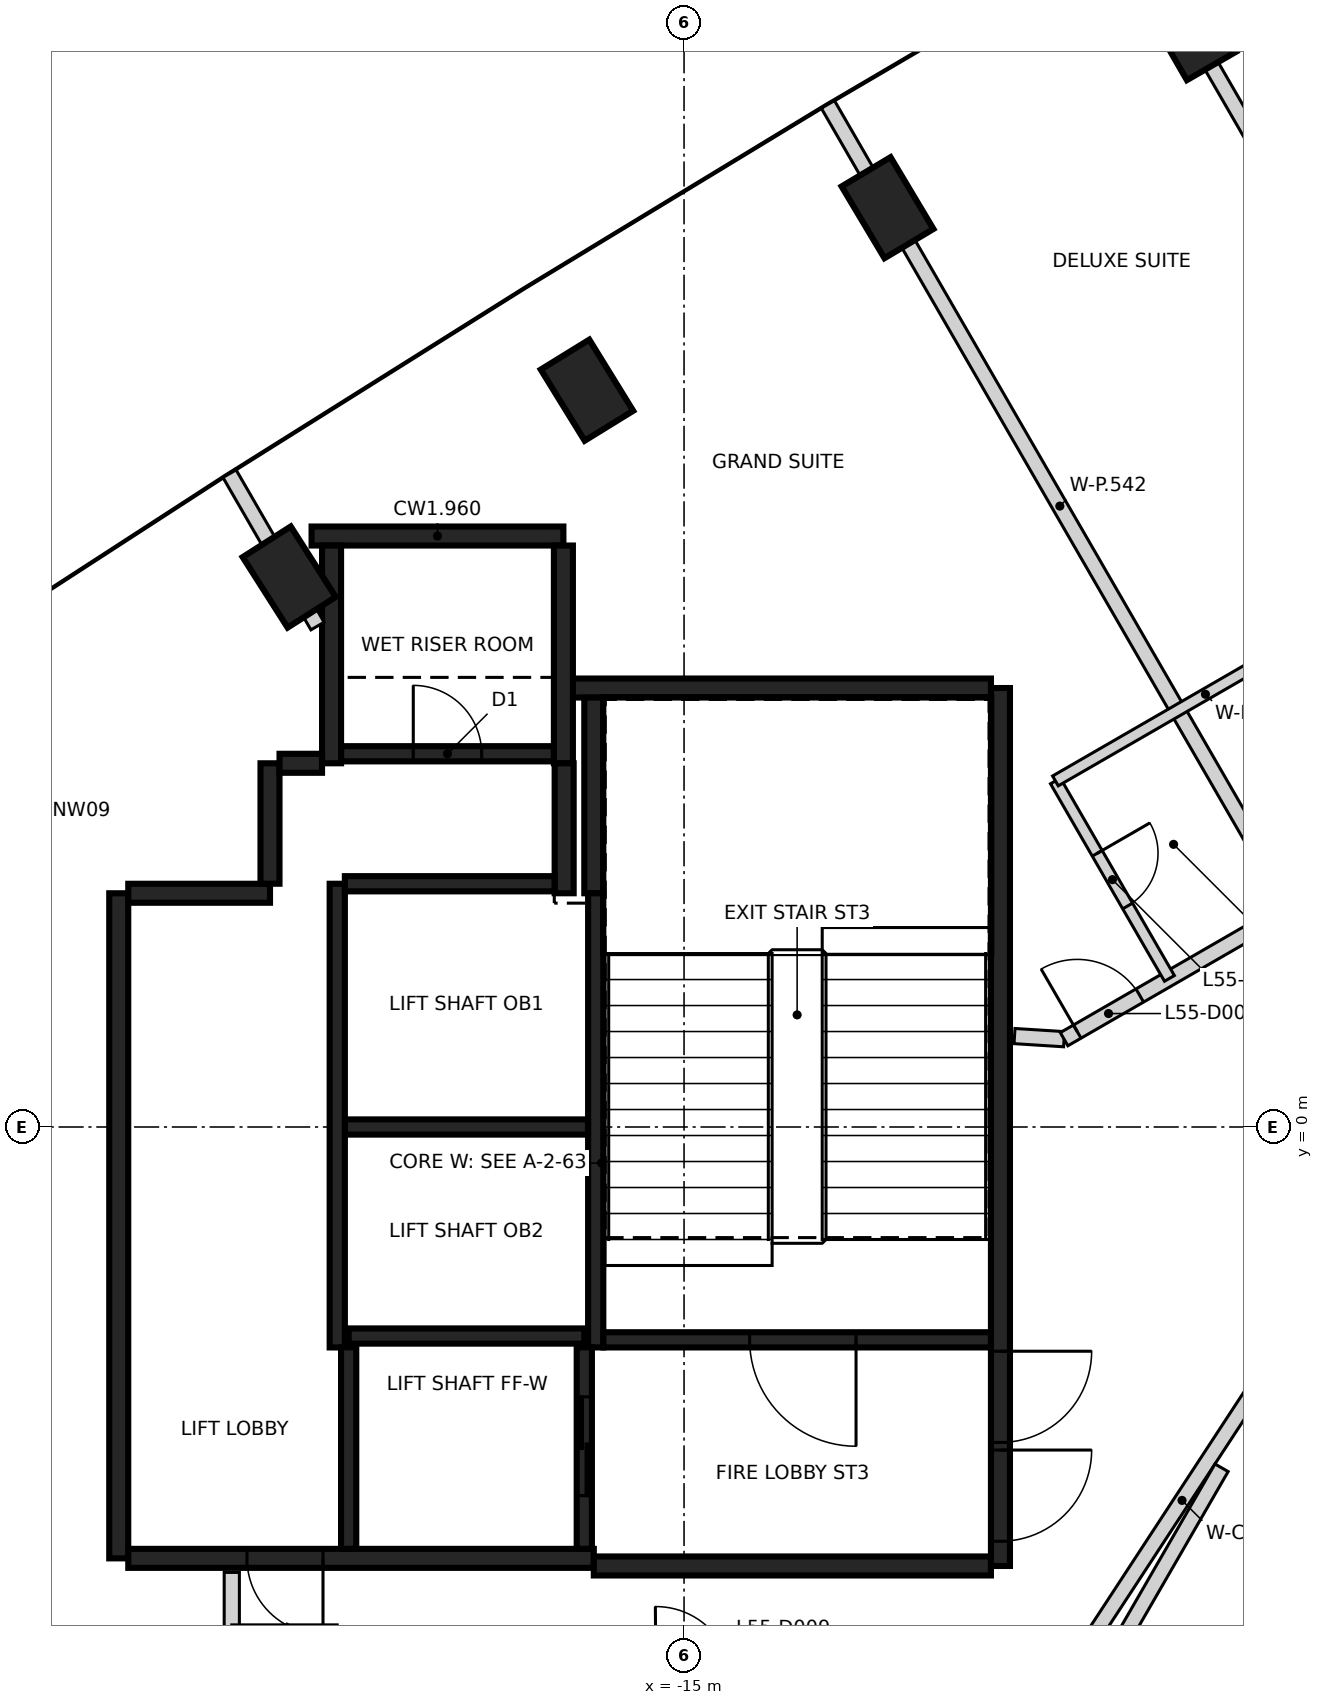
"""IFC4 building model, lengths in metres.
Left out: names, types, materials, properties, quantities, classifications, styles, units other than length and angle.
Written with IfcOpenShell. Run it as: python <this file> out.ifc"""

import sys

from ifc_helpers import new_model, si_unit, direction, frame, frame_2d, origin, origin_2d, place, context, subcontext, project, spatial, rectangle, extrude, element, fill, save


model = new_model("IFC4")
c1 = context("Model", 3, precision=1e-05, world=origin(), true_north=direction((0.0, 1.0)))
c2 = subcontext(c1, "Body", "Model", "MODEL_VIEW")
j1 = project(units=[si_unit("LENGTHUNIT", "METRE"), si_unit("PLANEANGLEUNIT", "RADIAN")], contexts=[c1])
p1 = place(None, origin())
s1 = spatial("IfcSite", under=j1, at=p1, CompositionType="ELEMENT")
p2 = place(p1, origin())
s2 = spatial("IfcBuilding", under=s1, at=p2, CompositionType="ELEMENT")
p3 = place(p2, frame((0.0, 0.0, 221.4)))
s3 = spatial("IfcBuildingStorey", under=s2, at=p3, CompositionType="ELEMENT", Elevation=221.4)
for number, where, z_axis, x_axis in (
    (1, (-8.335, 14.436, -0.35), (0.0, 0.0, 1.0), (-0.5, 0.866, 0.0)),
    (2, (-12.323, 12.094, -0.35), (0.0, 0.0, 1.0), (-0.513, 0.858, 0.0)),
    (3, (-16.277, 9.693, -0.35), (0.0, 0.0, 1.0), (-0.525, 0.851, 0.0)),
    (4, (-20.195, 7.235, -0.35), (0.0, 0.0, 1.0), (-0.538, 0.843, 0.0)),
):
    element("IfcColumn", number, at=place(p3, frame(where, z_axis=z_axis, x_axis=x_axis)), inside=s3, PredefinedType="COLUMN", context=c2, shape_type="SweptSolid", body=[
        extrude(rectangle(XDim=1.1, YDim=0.75, at=origin_2d()), origin(), (0.0, 0.0, 1.0), 3.6),
    ])
p4 = place(p3, frame((-10.837, 5.775, 0.0), z_axis=(0.0, 0.0, 1.0), x_axis=(0.0, -1.0, 0.0)))
e5 = element("IfcWall", 5, at=p4, inside=s3, PredefinedType="SHEAR", context=c2, shape_type="SweptSolid", body=[
    extrude(rectangle(XDim=11.55, YDim=0.25, at=frame_2d((5.775, 0.0))), origin(), (0.0, 0.0, 1.0), 3.25),
])
p5 = place(p4, frame((10.025, 0.0, 0.0)))
e6 = element("IfcOpeningElement", 6, at=p5, cuts=e5, PredefinedType="OPENING", context=c2, shape_type="SweptSolid", body=[
    extrude(rectangle(XDim=1.2, YDim=2.1, at=frame_2d((0.6, 1.05))), frame((0.0, 0.135, 0.0), z_axis=(0.0, -1.0, 0.0), x_axis=(1.0, 0.0, 0.0)), (0.0, 0.0, 1.0), 0.27),
])
p6 = place(p4, frame((8.725, 0.0, 0.0)))
e7 = element("IfcOpeningElement", 7, at=p6, cuts=e5, PredefinedType="OPENING", context=c2, shape_type="SweptSolid", body=[
    extrude(rectangle(XDim=1.2, YDim=2.1, at=frame_2d((0.6, 1.05))), frame((0.0, 0.135, 0.0), z_axis=(0.0, -1.0, 0.0), x_axis=(1.0, 0.0, 0.0)), (0.0, 0.0, 1.0), 0.27),
])
p7 = place(p3, frame((-22.437, -5.675, 0.0), z_axis=(0.0, 0.0, 1.0), x_axis=(0.0, 1.0, 0.0)))
e8 = element("IfcWall", 8, at=p7, inside=s3, PredefinedType="SHEAR", context=c2, shape_type="SweptSolid", body=[
    extrude(rectangle(XDim=8.75, YDim=0.25, at=frame_2d((4.375, 0.0))), origin(), (0.0, 0.0, 1.0), 3.25),
])
p8 = place(p3, frame((-16.187, -5.675, 0.0), z_axis=(0.0, 0.0, 1.0), x_axis=(-1.0, 0.0, 0.0)))
e9 = element("IfcWall", 9, at=p8, inside=s3, PredefinedType="SHEAR", context=c2, shape_type="SweptSolid", body=[
    extrude(rectangle(XDim=6.125, YDim=0.25, at=frame_2d((3.062, 0.0))), origin(), (0.0, 0.0, 1.0), 3.25),
])
p9 = place(p8, frame((3.563, 0.0, 0.0)))
e10 = element("IfcOpeningElement", 10, at=p9, cuts=e9, PredefinedType="OPENING", context=c2, shape_type="SweptSolid", body=[
    extrude(rectangle(XDim=1.0, YDim=2.1, at=frame_2d((0.5, 1.05))), frame((0.0, 0.135, 0.0), z_axis=(0.0, -1.0, 0.0), x_axis=(1.0, 0.0, 0.0)), (0.0, 0.0, 1.0), 0.27),
])
p10 = place(p3, frame((-10.963, -5.775, 0.0), z_axis=(0.0, 0.0, 1.0), x_axis=(-1.0, 0.0, 0.0)))
e11 = element("IfcWall", 11, at=p10, inside=s3, PredefinedType="SHEAR", context=c2, shape_type="SweptSolid", body=[
    extrude(rectangle(XDim=5.225, YDim=0.25, at=frame_2d((2.612, 0.0))), origin(), (0.0, 0.0, 1.0), 3.25),
])
p11 = place(p3, frame((-16.472, 5.775, 0.0), z_axis=(0.0, 0.0, 1.0), x_axis=(1.0, 0.0, 0.0)))
e12 = element("IfcWall", 12, at=p11, inside=s3, PredefinedType="SHEAR", context=c2, shape_type="SweptSolid", body=[
    extrude(rectangle(XDim=5.51, YDim=0.25, at=frame_2d((2.755, 0.0))), origin(), (0.0, 0.0, 1.0), 3.25),
])
p12 = place(p3, frame((-19.9, 7.775, 0.0), z_axis=(0.0, 0.0, 1.0), x_axis=(1.0, 0.0, 0.0)))
e13 = element("IfcWall", 13, at=p12, inside=s3, PredefinedType="SHEAR", context=c2, shape_type="SweptSolid", body=[
    extrude(rectangle(XDim=3.313, YDim=0.25, at=frame_2d((1.656, 0.0))), origin(), (0.0, 0.0, 1.0), 3.25),
])
for number, where, z_axis, x_axis in (
    (14, (-16.587, 7.65, 0.0), (0.0, 0.0, 1.0), (0.0, -1.0, 0.0)),
    (15, (-19.637, 4.785, 0.0), (0.0, 0.0, 1.0), (0.0, 1.0, 0.0)),
):
    element("IfcWall", number, at=place(p3, frame(where, z_axis=z_axis, x_axis=x_axis)), inside=s3, PredefinedType="SHEAR", context=c2, shape_type="SweptSolid", body=[
        extrude(rectangle(XDim=2.865, YDim=0.25, at=frame_2d((1.432, 0.0))), origin(), (0.0, 0.0, 1.0), 3.25),
    ])
p13 = place(p3, frame((-16.187, 3.075, 0.0), z_axis=(0.0, 0.0, 1.0), x_axis=(0.0, 1.0, 0.0)))
e16 = element("IfcWall", 16, at=p13, inside=s3, PredefinedType="SHEAR", context=c2, shape_type="SweptSolid", body=[
    extrude(rectangle(XDim=2.575, YDim=0.25, at=frame_2d((1.287, 0.0))), origin(), (0.0, 0.0, 1.0), 3.25),
])
p14 = place(p3, frame((-22.312, 3.075, 0.0), z_axis=(0.0, 0.0, 1.0), x_axis=(1.0, 0.0, 0.0)))
e17 = element("IfcWall", 17, at=p14, inside=s3, PredefinedType="SHEAR", context=c2, shape_type="SweptSolid", body=[
    extrude(rectangle(XDim=1.865, YDim=0.25, at=frame_2d((0.932, 0.0))), origin(), (0.0, 0.0, 1.0), 3.25),
])
p15 = place(p3, frame((-16.577, 4.785, 0.0), z_axis=(0.0, 0.0, 1.0), x_axis=(0.0, -1.0, 0.0)))
e18 = element("IfcWall", 18, at=p15, inside=s3, PredefinedType="SHEAR", context=c2, shape_type="SweptSolid", body=[
    extrude(rectangle(XDim=1.71, YDim=0.25, at=frame_2d((0.855, 0.0))), origin(), (0.0, 0.0, 1.0), 3.25),
])
p16 = place(p3, frame((-20.447, 3.2, 0.0), z_axis=(0.0, 0.0, 1.0), x_axis=(0.0, 1.0, 0.0)))
e19 = element("IfcWall", 19, at=p16, inside=s3, PredefinedType="SHEAR", context=c2, shape_type="SweptSolid", body=[
    extrude(rectangle(XDim=1.584, YDim=0.25, at=frame_2d((0.792, 0.0))), origin(), (0.0, 0.0, 1.0), 3.25),
])
p17 = place(p3, frame((-20.322, 4.785, 0.0), z_axis=(0.0, 0.0, 1.0), x_axis=(1.0, 0.0, 0.0)))
e20 = element("IfcWall", 20, at=p17, inside=s3, PredefinedType="SHEAR", context=c2, shape_type="SweptSolid", body=[
    extrude(rectangle(XDim=0.559, YDim=0.25, at=frame_2d((0.28, 0.0))), origin(), (0.0, 0.0, 1.0), 3.25),
])
p18 = place(p3, frame((-16.162, 3.074, 0.0), z_axis=(0.0, 0.0, 1.0), x_axis=(0.0, -1.0, 0.0)))
e21 = element("IfcWall", 21, at=p18, inside=s3, PredefinedType="SHEAR", context=c2, shape_type="SweptSolid", body=[
    extrude(rectangle(XDim=5.974, YDim=0.2, at=frame_2d((2.987, 0.0))), origin(), (0.0, 0.0, 1.0), 3.25),
])
p19 = place(p3, frame((-19.562, -2.9, 0.0), z_axis=(0.0, 0.0, 1.0), x_axis=(0.0, 1.0, 0.0)))
e22 = element("IfcWall", 22, at=p19, inside=s3, PredefinedType="SHEAR", context=c2, shape_type="SweptSolid", body=[
    extrude(rectangle(XDim=6.1, YDim=0.2, at=frame_2d((3.05, 0.0))), origin(), (0.0, 0.0, 1.0), 3.25),
])
p20 = place(p3, frame((-10.963, -2.8, 0.0), z_axis=(0.0, 0.0, 1.0), x_axis=(-1.0, 0.0, 0.0)))
e23 = element("IfcWall", 23, at=p20, inside=s3, PredefinedType="SHEAR", context=c2, shape_type="SweptSolid", body=[
    extrude(rectangle(XDim=5.098, YDim=0.2, at=frame_2d((2.549, 0.0))), origin(), (0.0, 0.0, 1.0), 3.25),
])
p21 = place(p20, frame((1.774, 0.0, 0.0)))
e24 = element("IfcOpeningElement", 24, at=p21, cuts=e23, PredefinedType="OPENING", context=c2, shape_type="SweptSolid", body=[
    extrude(rectangle(XDim=1.4, YDim=2.1, at=frame_2d((0.7, 1.05))), frame((0.0, 0.11, 0.0), z_axis=(0.0, -1.0, 0.0), x_axis=(1.0, 0.0, 0.0)), (0.0, 0.0, 1.0), 0.22),
])
p22 = place(p3, frame((-16.263, 0.0, 0.0), z_axis=(0.0, 0.0, 1.0), x_axis=(-1.0, 0.0, 0.0)))
e25 = element("IfcWall", 25, at=p22, inside=s3, PredefinedType="SHEAR", context=c2, shape_type="SweptSolid", body=[
    extrude(rectangle(XDim=3.198, YDim=0.2, at=frame_2d((1.599, 0.0))), origin(), (0.0, 0.0, 1.0), 3.25),
])
p23 = place(p3, frame((-19.511, 4.91, 0.0), z_axis=(0.0, 0.0, 1.0), x_axis=(1.0, 0.0, 0.0)))
e26 = element("IfcWall", 26, at=p23, inside=s3, PredefinedType="SHEAR", context=c2, shape_type="SweptSolid", body=[
    extrude(rectangle(XDim=2.798, YDim=0.2, at=frame_2d((1.399, 0.0))), origin(), (0.0, 0.0, 1.0), 3.25),
])
p24 = place(p23, frame((0.949, 0.0, 0.0)))
e27 = element("IfcOpeningElement", 27, at=p24, cuts=e26, PredefinedType="OPENING", context=c2, shape_type="SweptSolid", body=[
    extrude(rectangle(XDim=0.9, YDim=2.1, at=frame_2d((0.45, 1.05))), frame((0.0, 0.11, 0.0), z_axis=(0.0, -1.0, 0.0), x_axis=(1.0, 0.0, 0.0)), (0.0, 0.0, 1.0), 0.22),
])
p25 = place(p3, frame((-19.462, 3.2, 0.0), z_axis=(0.0, 0.0, 1.0), x_axis=(1.0, 0.0, 0.0)))
e28 = element("IfcWall", 28, at=p25, inside=s3, PredefinedType="SHEAR", context=c2, shape_type="SweptSolid", body=[
    extrude(rectangle(XDim=2.759, YDim=0.2, at=frame_2d((1.379, 0.0))), origin(), (0.0, 0.0, 1.0), 3.25),
])
p26 = place(p3, frame((-19.412, -2.75, 0.0), z_axis=(0.0, 0.0, 1.0), x_axis=(1.0, 0.0, 0.0)))
e29 = element("IfcWall", 29, at=p26, inside=s3, PredefinedType="SHEAR", context=c2, shape_type="SweptSolid", body=[
    extrude(rectangle(XDim=3.1, YDim=0.2, at=frame_2d((1.55, 0.0))), origin(), (0.0, 0.0, 1.0), 3.25),
])
p27 = place(p3, frame((-16.312, -2.898, 0.0), z_axis=(0.0, 0.0, 1.0), x_axis=(0.0, -1.0, 0.0)))
e30 = element("IfcWall", 30, at=p27, inside=s3, PredefinedType="SHEAR", context=c2, shape_type="SweptSolid", body=[
    extrude(rectangle(XDim=2.651, YDim=0.2, at=frame_2d((1.325, 0.0))), origin(), (0.0, 0.0, 1.0), 3.25),
])
p28 = place(p27, frame((0.652, 0.0, 0.0)))
e31 = element("IfcOpeningElement", 31, at=p28, cuts=e30, PredefinedType="OPENING", context=c2, shape_type="SweptSolid", body=[
    extrude(rectangle(XDim=1.3, YDim=2.1, at=frame_2d((0.65, 1.05))), frame((0.0, 0.11, 0.0), z_axis=(0.0, -1.0, 0.0), x_axis=(1.0, 0.0, 0.0)), (0.0, 0.0, 1.0), 0.22),
])
p29 = place(p3, frame((-19.412, -5.549, 0.0), z_axis=(0.0, 0.0, 1.0), x_axis=(0.0, 1.0, 0.0)))
e32 = element("IfcWall", 32, at=p29, inside=s3, PredefinedType="SHEAR", context=c2, shape_type="SweptSolid", body=[
    extrude(rectangle(XDim=2.651, YDim=0.2, at=frame_2d((1.325, 0.0))), origin(), (0.0, 0.0, 1.0), 3.25),
])
p30 = place(p3, frame((-20.95, -6.65, 0.0), z_axis=(0.0, 0.0, 1.0), x_axis=(0.0, 1.0, 0.0)))
e33 = element("IfcWall", 33, at=p30, inside=s3, PredefinedType="PARTITIONING", context=c2, shape_type="SweptSolid", body=[
    extrude(rectangle(XDim=0.79, YDim=0.2, at=frame_2d((0.395, 0.0))), origin(), (0.0, 0.0, 1.0), 2.35),
])
p31 = place(p3, frame((-20.95, -6.65, 0.0), z_axis=(0.0, 0.0, 1.0), x_axis=(1.0, 0.0, 0.0)))
e34 = element("IfcWall", 34, at=p31, inside=s3, PredefinedType="PARTITIONING", context=c2, shape_type="SweptSolid", body=[
    extrude(rectangle(XDim=1.387, YDim=0.2, at=frame_2d((0.693, 0.0))), origin(), (0.0, 0.0, 1.0), 2.35),
])
p32 = place(p3, frame((-10.652, 1.196, 0.0), z_axis=(0.0, 0.0, 1.0), x_axis=(0.998005794618, -0.063122372489, 0.0)))
e35 = element("IfcWall", 35, at=p32, inside=s3, PredefinedType="PARTITIONING", context=c2, shape_type="SweptSolid", body=[
    extrude(rectangle(XDim=0.654, YDim=0.2, at=frame_2d((0.327, 0.0))), origin(), (0.0, 0.0, 1.0), 3.25),
])
p33 = place(p3, frame((-10.0, 1.155, 0.0), z_axis=(0.0, 0.0, 1.0), x_axis=(0.866014095592, 0.500019585852, 0.0)))
e36 = element("IfcWall", 36, at=p33, inside=s3, PredefinedType="PARTITIONING", context=c2, shape_type="SweptSolid", body=[
    extrude(rectangle(XDim=12.708, YDim=0.2, at=frame_2d((6.354, 0.0))), origin(), (0.0, 0.0, 1.0), 3.25),
])
p34 = place(p33, frame((6.944, 0.0, 0.0)))
e37 = element("IfcOpeningElement", 37, at=p34, cuts=e36, PredefinedType="OPENING", context=c2, shape_type="SweptSolid", body=[
    extrude(rectangle(XDim=0.95, YDim=2.1, at=frame_2d((0.475, 1.05))), frame((0.0, 0.11, 0.0), z_axis=(0.0, -1.0, 0.0), x_axis=(1.0, 0.0, 0.0)), (0.0, 0.0, 1.0), 0.22),
])
p35 = place(p33, frame((0.2, 0.0, 0.0)))
e38 = element("IfcOpeningElement", 38, at=p35, cuts=e36, PredefinedType="OPENING", context=c2, shape_type="SweptSolid", body=[
    extrude(rectangle(XDim=0.95, YDim=2.1, at=frame_2d((0.475, 1.05))), frame((0.0, 0.11, 0.0), z_axis=(0.0, -1.0, 0.0), x_axis=(1.0, 0.0, 0.0)), (0.0, 0.0, 1.0), 0.22),
])
p36 = place(p3, frame((-9.808, -6.989, 0.0), z_axis=(0.0, 0.0, 1.0), x_axis=(0.547746188785, 0.836644555753, 0.0)))
e39 = element("IfcWall", 39, at=p36, inside=s3, PredefinedType="PARTITIONING", context=c2, shape_type="SweptSolid", body=[
    extrude(rectangle(XDim=4.964, YDim=0.2, at=frame_2d((2.482, 0.0))), origin(), (0.0, 0.0, 1.0), 3.25),
])
p37 = place(p3, frame((-20.979, 8.595, 0.0), z_axis=(0.0, 0.0, 1.0), x_axis=(0.499950711303, -0.866053858757, 0.0)))
e40 = element("IfcWall", 40, at=p37, inside=s3, PredefinedType="PARTITIONING", context=c2, shape_type="SweptSolid", body=[
    extrude(rectangle(XDim=2.315, YDim=0.2, at=frame_2d((1.157, 0.0))), origin(), (0.0, 0.0, 1.0), 3.25),
])
p38 = place(p3, frame((-13.107, 13.453, 0.0), z_axis=(0.0, 0.0, 1.0), x_axis=(0.500037611077, -0.86600368793, 0.0)))
e41 = element("IfcWall", 41, at=p38, inside=s3, PredefinedType="PARTITIONING", context=c2, shape_type="SweptSolid", body=[
    extrude(rectangle(XDim=12.204, YDim=0.2, at=frame_2d((6.102, 0.0))), origin(), (0.0, 0.0, 1.0), 3.25),
])
p39 = place(p3, frame((-13.107, -13.453, 0.0), z_axis=(0.0, 0.0, 1.0), x_axis=(0.500020349827, 0.866013654488, 0.0)))
e42 = element("IfcWall", 42, at=p39, inside=s3, PredefinedType="PARTITIONING", context=c2, shape_type="SweptSolid", body=[
    extrude(rectangle(XDim=10.357, YDim=0.2, at=frame_2d((5.179, 0.0))), origin(), (0.0, 0.0, 1.0), 3.25),
])
for number, where, z_axis, x_axis in (
    (43, (-9.119, 15.795, 0.0), (0.0, 0.0, 1.0), (0.5, -0.866, 0.0)),
    (44, (-9.119, -15.795, 0.0), (0.0, 0.0, 1.0), (0.5, 0.866, 0.0)),
):
    element("IfcWall", number, at=place(p3, frame(where, z_axis=z_axis, x_axis=x_axis)), inside=s3, PredefinedType="PARTITIONING", context=c2, shape_type="SweptSolid", body=[
        extrude(rectangle(XDim=12.238, YDim=0.2, at=frame_2d((6.119, 0.0))), origin(), (0.0, 0.0, 1.0), 3.25),
    ])
p40 = place(p3, frame((-10.114, 4.553, 0.0), z_axis=(0.0, 0.0, 1.0), x_axis=(0.50002537861, -0.866010750942, 0.0)))
e45 = element("IfcWall", 45, at=p40, inside=s3, PredefinedType="PARTITIONING", context=c2, shape_type="SweptSolid", body=[
    extrude(rectangle(XDim=3.0, YDim=0.15, at=frame_2d((1.5, 0.0))), origin(), (0.0, 0.0, 1.0), 3.25),
])
p41 = place(p40, frame((1.1, 0.0, 0.0)))
e46 = element("IfcOpeningElement", 46, at=p41, cuts=e45, PredefinedType="OPENING", context=c2, shape_type="SweptSolid", body=[
    extrude(rectangle(XDim=0.8, YDim=2.1, at=frame_2d((0.4, 1.05))), frame((0.0, 0.085, 0.0), z_axis=(0.0, -1.0, 0.0), x_axis=(1.0, 0.0, 0.0)), (0.0, 0.0, 1.0), 0.17),
])
p42 = place(p3, frame((-10.114, 4.553, 0.0), z_axis=(0.0, 0.0, 1.0), x_axis=(0.866002713795, 0.500039298155, 0.0)))
e47 = element("IfcWall", 47, at=p42, inside=s3, PredefinedType="PARTITIONING", context=c2, shape_type="SweptSolid", body=[
    extrude(rectangle(XDim=4.558, YDim=0.15, at=frame_2d((2.279, 0.0))), origin(), (0.0, 0.0, 1.0), 3.25),
])
p43 = place(p28, origin())
e48 = element("IfcDoor", 48, at=p43, inside=s3, OperationType="SLIDING_TO_LEFT", PredefinedType="DOOR", context=c2, shape_type="SweptSolid", body=[
    extrude(rectangle(XDim=1.3, YDim=2.1, at=frame_2d((0.65, 1.05))), frame((0.0, 0.025, 0.0), z_axis=(0.0, -1.0, 0.0), x_axis=(1.0, 0.0, 0.0)), (0.0, 0.0, 1.0), 0.05),
])
fill(e31, e48)
p44 = place(p9, origin())
e49 = element("IfcDoor", 49, at=p44, inside=s3, OperationType="SINGLE_SWING_LEFT", PredefinedType="DOOR", context=c2, shape_type="SweptSolid", body=[
    extrude(rectangle(XDim=1.0, YDim=2.1, at=frame_2d((0.5, 1.05))), frame((0.0, 0.025, 0.0), z_axis=(0.0, -1.0, 0.0), x_axis=(1.0, 0.0, 0.0)), (0.0, 0.0, 1.0), 0.05),
])
fill(e10, e49)
p45 = place(p5, origin())
e50 = element("IfcDoor", 50, at=p45, inside=s3, OperationType="SINGLE_SWING_LEFT", PredefinedType="DOOR", context=c2, shape_type="SweptSolid", body=[
    extrude(rectangle(XDim=1.2, YDim=2.1, at=frame_2d((0.6, 1.05))), frame((0.0, 0.025, 0.0), z_axis=(0.0, -1.0, 0.0), x_axis=(1.0, 0.0, 0.0)), (0.0, 0.0, 1.0), 0.05),
])
fill(e6, e50)
p46 = place(p6, origin())
e51 = element("IfcDoor", 51, at=p46, inside=s3, OperationType="SINGLE_SWING_RIGHT", PredefinedType="DOOR", context=c2, shape_type="SweptSolid", body=[
    extrude(rectangle(XDim=1.2, YDim=2.1, at=frame_2d((0.6, 1.05))), frame((0.0, 0.025, 0.0), z_axis=(0.0, -1.0, 0.0), x_axis=(1.0, 0.0, 0.0)), (0.0, 0.0, 1.0), 0.05),
])
fill(e7, e51)
p47 = place(p21, origin())
e52 = element("IfcDoor", 52, at=p47, inside=s3, OperationType="SINGLE_SWING_LEFT", PredefinedType="DOOR", context=c2, shape_type="SweptSolid", body=[
    extrude(rectangle(XDim=1.4, YDim=2.1, at=frame_2d((0.7, 1.05))), frame((0.0, 0.025, 0.0), z_axis=(0.0, -1.0, 0.0), x_axis=(1.0, 0.0, 0.0)), (0.0, 0.0, 1.0), 0.05),
])
fill(e24, e52)
p48 = place(p24, origin())
e53 = element("IfcDoor", 53, at=p48, inside=s3, OperationType="SINGLE_SWING_RIGHT", PredefinedType="DOOR", context=c2, shape_type="SweptSolid", body=[
    extrude(rectangle(XDim=0.9, YDim=2.1, at=frame_2d((0.45, 1.05))), frame((0.0, 0.025, 0.0), z_axis=(0.0, -1.0, 0.0), x_axis=(1.0, 0.0, 0.0)), (0.0, 0.0, 1.0), 0.05),
])
fill(e27, e53)
p49 = place(p35, origin())
e54 = element("IfcDoor", 54, at=p49, inside=s3, OperationType="SINGLE_SWING_LEFT", PredefinedType="DOOR", context=c2, shape_type="SweptSolid", body=[
    extrude(rectangle(XDim=0.95, YDim=2.1, at=frame_2d((0.475, 1.05))), frame((0.0, 0.025, 0.0), z_axis=(0.0, -1.0, 0.0), x_axis=(1.0, 0.0, 0.0)), (0.0, 0.0, 1.0), 0.05),
])
fill(e38, e54)
p50 = place(p41, frame((0.8, 0.0, 0.0), z_axis=(0.0, 0.0, 1.0), x_axis=(-1.0, 0.0, 0.0)))
e55 = element("IfcDoor", 55, at=p50, inside=s3, OperationType="SINGLE_SWING_LEFT", PredefinedType="DOOR", context=c2, shape_type="SweptSolid", body=[
    extrude(rectangle(XDim=0.8, YDim=2.1, at=frame_2d((0.4, 1.05))), frame((0.0, 0.025, 0.0), z_axis=(0.0, -1.0, 0.0), x_axis=(1.0, 0.0, 0.0)), (0.0, 0.0, 1.0), 0.05),
])
fill(e46, e55)
save(model, sys.argv[1])
